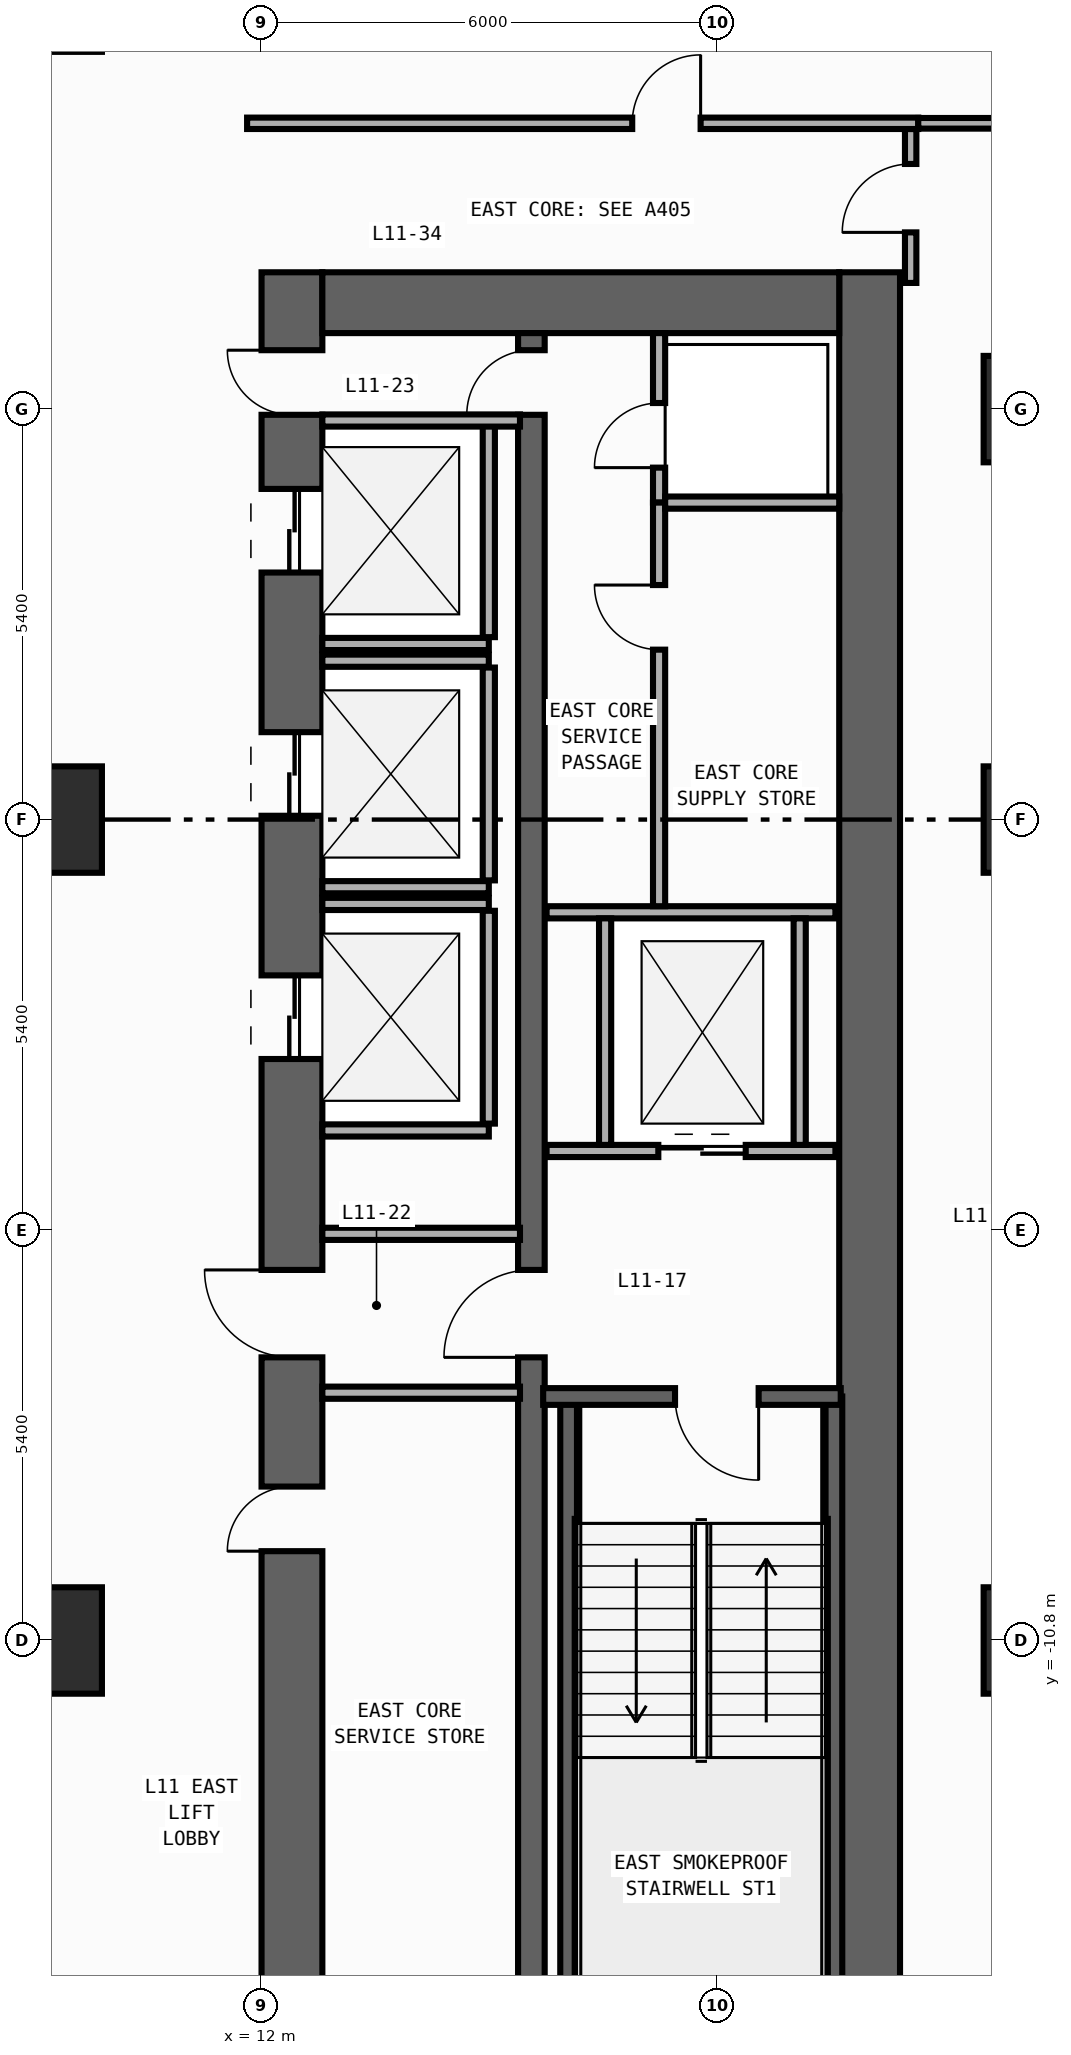
"""IFC4 building model, lengths in metres.
Left out: names, types, materials, properties, quantities, classifications, styles, units other than length and angle.
Written with IfcOpenShell. Run it as: python <this file> out.ifc"""

import sys

from ifc_helpers import new_model, si_unit, direction, frame, frame_2d, origin, origin_2d, place, context, subcontext, project, spatial, rectangle, extrude, element, fill, save


model = new_model("IFC4")
c1 = context("Model", 3, precision=1e-05, world=origin(), true_north=direction((0.0, 1.0)))
c2 = subcontext(c1, "Body", "Model", "MODEL_VIEW")
j1 = project(units=[si_unit("LENGTHUNIT", "METRE"), si_unit("PLANEANGLEUNIT", "RADIAN")], contexts=[c1])
p1 = place(None, origin())
s1 = spatial("IfcSite", under=j1, at=p1, CompositionType="ELEMENT")
p2 = place(p1, origin())
s2 = spatial("IfcBuilding", under=s1, at=p2, CompositionType="ELEMENT")
p3 = place(p2, frame((0.0, 0.0, 47.0)))
s3 = spatial("IfcBuildingStorey", under=s2, at=p3, CompositionType="ELEMENT", Elevation=47.0)
p4 = place(p3, frame((12.4, -19.8, 0.0), z_axis=(0.0, 0.0, 1.0), x_axis=(0.0, 1.0, 0.0)))
e1 = element("IfcWall", 1, at=p4, inside=s3, PredefinedType="SHEAR", context=c2, shape_type="SweptSolid", body=[
    extrude(rectangle(XDim=27.0, YDim=0.8, at=frame_2d((13.5, 0.0))), origin(), (0.0, 0.0, 1.0), 3.94),
])
p5 = place(p4, frame((23.05, 0.0, 0.0)))
e2 = element("IfcOpeningElement", 2, at=p5, cuts=e1, PredefinedType="OPENING", context=c2, shape_type="SweptSolid", body=[
    extrude(rectangle(XDim=1.1, YDim=2.2, at=frame_2d((0.55, 1.1))), frame((0.0, 0.41, 0.0), z_axis=(0.0, -1.0, 0.0), x_axis=(1.0, 0.0, 0.0)), (0.0, 0.0, 1.0), 0.82),
])
p6 = place(p4, frame((19.85, 0.0, 0.0)))
e3 = element("IfcOpeningElement", 3, at=p6, cuts=e1, PredefinedType="OPENING", context=c2, shape_type="SweptSolid", body=[
    extrude(rectangle(XDim=1.1, YDim=2.2, at=frame_2d((0.55, 1.1))), frame((0.0, 0.41, 0.0), z_axis=(0.0, -1.0, 0.0), x_axis=(1.0, 0.0, 0.0)), (0.0, 0.0, 1.0), 0.82),
])
p7 = place(p4, frame((16.65, 0.0, 0.0)))
e4 = element("IfcOpeningElement", 4, at=p7, cuts=e1, PredefinedType="OPENING", context=c2, shape_type="SweptSolid", body=[
    extrude(rectangle(XDim=1.1, YDim=2.2, at=frame_2d((0.55, 1.1))), frame((0.0, 0.41, 0.0), z_axis=(0.0, -1.0, 0.0), x_axis=(1.0, 0.0, 0.0)), (0.0, 0.0, 1.0), 0.82),
])
p8 = place(p4, frame((10.175, 0.0, 0.0)))
e5 = element("IfcOpeningElement", 5, at=p8, cuts=e1, PredefinedType="OPENING", context=c2, shape_type="SweptSolid", body=[
    extrude(rectangle(XDim=0.85, YDim=2.1, at=frame_2d((0.425, 1.05))), frame((0.0, 0.41, 0.0), z_axis=(0.0, -1.0, 0.0), x_axis=(1.0, 0.0, 0.0)), (0.0, 0.0, 1.0), 0.82),
])
p9 = place(p4, frame((12.725, 0.0, 0.0)))
e6 = element("IfcOpeningElement", 6, at=p9, cuts=e1, PredefinedType="OPENING", context=c2, shape_type="SweptSolid", body=[
    extrude(rectangle(XDim=1.15, YDim=2.2, at=frame_2d((0.575, 1.1))), frame((0.0, 0.41, 0.0), z_axis=(0.0, -1.0, 0.0), x_axis=(1.0, 0.0, 0.0)), (0.0, 0.0, 1.0), 0.82),
])
p10 = place(p4, frame((25.125, 0.0, 0.0)))
e7 = element("IfcOpeningElement", 7, at=p10, cuts=e1, PredefinedType="OPENING", context=c2, shape_type="SweptSolid", body=[
    extrude(rectangle(XDim=0.85, YDim=2.1, at=frame_2d((0.425, 1.05))), frame((0.0, 0.41, 0.0), z_axis=(0.0, -1.0, 0.0), x_axis=(1.0, 0.0, 0.0)), (0.0, 0.0, 1.0), 0.82),
])
p11 = place(p3, frame((20.0, -19.8, 0.0), z_axis=(0.0, 0.0, 1.0), x_axis=(0.0, 1.0, 0.0)))
e8 = element("IfcWall", 8, at=p11, inside=s3, PredefinedType="SHEAR", context=c2, shape_type="SweptSolid", body=[
    extrude(rectangle(XDim=27.0, YDim=0.8, at=frame_2d((13.5, 0.0))), origin(), (0.0, 0.0, 1.0), 3.94),
])
p12 = place(p3, frame((12.8, 6.8, 0.0), z_axis=(0.0, 0.0, 1.0), x_axis=(1.0, 0.0, 0.0)))
e9 = element("IfcWall", 9, at=p12, inside=s3, PredefinedType="SHEAR", context=c2, shape_type="SweptSolid", body=[
    extrude(rectangle(XDim=6.8, YDim=0.8, at=frame_2d((3.4, 0.0))), origin(), (0.0, 0.0, 1.0), 3.94),
])
p13 = place(p3, frame((15.55, -19.0, 0.0), z_axis=(0.0, 0.0, 1.0), x_axis=(0.0, 1.0, 0.0)))
e10 = element("IfcWall", 10, at=p13, inside=s3, PredefinedType="SHEAR", context=c2, shape_type="SweptSolid", body=[
    extrude(rectangle(XDim=25.4, YDim=0.35, at=frame_2d((12.7, 0.0))), origin(), (0.0, 0.0, 1.0), 3.94),
])
p14 = place(p13, frame((11.925, 0.0, 0.0)))
e11 = element("IfcOpeningElement", 11, at=p14, cuts=e10, PredefinedType="OPENING", context=c2, shape_type="SweptSolid", body=[
    extrude(rectangle(XDim=1.15, YDim=2.2, at=frame_2d((0.575, 1.1))), frame((0.0, 0.185, 0.0), z_axis=(0.0, -1.0, 0.0), x_axis=(1.0, 0.0, 0.0)), (0.0, 0.0, 1.0), 0.37),
])
p15 = place(p13, frame((24.325, 0.0, 0.0)))
e12 = element("IfcOpeningElement", 12, at=p15, cuts=e10, PredefinedType="OPENING", context=c2, shape_type="SweptSolid", body=[
    extrude(rectangle(XDim=0.85, YDim=2.1, at=frame_2d((0.425, 1.05))), frame((0.0, 0.185, 0.0), z_axis=(0.0, -1.0, 0.0), x_axis=(1.0, 0.0, 0.0)), (0.0, 0.0, 1.0), 0.37),
])
for number, where, z_axis, x_axis in (
    (13, (16.04, -18.89, 0.0), (0.0, 0.0, 1.0), (0.0, 1.0, 0.0)),
    (14, (19.53, -18.89, 0.0), (0.0, 0.0, 1.0), (0.0, 1.0, 0.0)),
):
    element("IfcWall", number, at=place(p3, frame(where, z_axis=z_axis, x_axis=x_axis)), inside=s3, PredefinedType="SHEAR", context=c2, shape_type="SweptSolid", body=[
        extrude(rectangle(XDim=11.3, YDim=0.22, at=frame_2d((5.65, 0.0))), origin(), (0.0, 0.0, 1.0), 3.94),
    ])
p16 = place(p3, frame((19.62, -7.59, 0.0), z_axis=(0.0, 0.0, 1.0), x_axis=(-1.0, 0.0, 0.0)))
e15 = element("IfcWall", 15, at=p16, inside=s3, PredefinedType="SHEAR", context=c2, shape_type="SweptSolid", body=[
    extrude(rectangle(XDim=3.915, YDim=0.22, at=frame_2d((1.958, 0.0))), origin(), (0.0, 0.0, 1.0), 3.94),
])
p17 = place(p16, frame((1.08, 0.0, 0.0)))
e16 = element("IfcOpeningElement", 16, at=p17, cuts=e15, PredefinedType="OPENING", context=c2, shape_type="SweptSolid", body=[
    extrude(rectangle(XDim=1.1, YDim=2.2, at=frame_2d((0.55, 1.1))), frame((0.0, 0.12, 0.0), z_axis=(0.0, -1.0, 0.0), x_axis=(1.0, 0.0, 0.0)), (0.0, 0.0, 1.0), 0.24),
])
for number, where, z_axis, x_axis in (
    (17, (9.2, -10.8, 0.0), (0.0, 0.0, 1.0), (1.0, 0.0, 0.0)),
    (18, (9.2, 0.0, 0.0), (0.0, 0.0, 1.0), (1.0, 0.0, 0.0)),
    (19, (22.2, -10.8, 0.0), (0.0, 0.0, 1.0), (1.0, 0.0, 0.0)),
    (20, (22.2, 0.0, 0.0), (0.0, 0.0, 1.0), (1.0, 0.0, 0.0)),
    (21, (22.2, 5.4, 0.0), (0.0, 0.0, 1.0), (1.0, 0.0, 0.0)),
):
    element("IfcColumn", number, at=place(p3, frame(where, z_axis=z_axis, x_axis=x_axis)), inside=s3, PredefinedType="COLUMN", context=c2, shape_type="SweptSolid", body=[
        extrude(rectangle(XDim=1.4, YDim=1.4, at=origin_2d()), origin(), (0.0, 0.0, 1.0), 4.2),
    ])
p18 = place(p3, frame((12.8, 2.31, 0.0), z_axis=(0.0, 0.0, 1.0), x_axis=(1.0, 0.0, 0.0)))
e22 = element("IfcWall", 22, at=p18, inside=s3, PredefinedType="STANDARD", context=c2, shape_type="SweptSolid", body=[
    extrude(rectangle(XDim=2.19, YDim=0.16, at=frame_2d((1.095, 0.0))), origin(), (0.0, 0.0, 1.0), 3.94),
])
p19 = place(p3, frame((14.99, 2.4, 0.0), z_axis=(0.0, 0.0, 1.0), x_axis=(0.0, 1.0, 0.0)))
e23 = element("IfcWall", 23, at=p19, inside=s3, PredefinedType="STANDARD", context=c2, shape_type="SweptSolid", body=[
    extrude(rectangle(XDim=2.8, YDim=0.16, at=frame_2d((1.4, 0.0))), origin(), (0.0, 0.0, 1.0), 3.94),
])
for number, where, z_axis, x_axis in (
    (24, (12.8, -0.89, 0.0), (0.0, 0.0, 1.0), (1.0, 0.0, 0.0)),
    (25, (12.8, 2.09, 0.0), (0.0, 0.0, 1.0), (1.0, 0.0, 0.0)),
):
    element("IfcWall", number, at=place(p3, frame(where, z_axis=z_axis, x_axis=x_axis)), inside=s3, PredefinedType="STANDARD", context=c2, shape_type="SweptSolid", body=[
        extrude(rectangle(XDim=2.19, YDim=0.16, at=frame_2d((1.095, 0.0))), origin(), (0.0, 0.0, 1.0), 3.94),
    ])
p20 = place(p3, frame((14.99, -0.8, 0.0), z_axis=(0.0, 0.0, 1.0), x_axis=(0.0, 1.0, 0.0)))
e26 = element("IfcWall", 26, at=p20, inside=s3, PredefinedType="STANDARD", context=c2, shape_type="SweptSolid", body=[
    extrude(rectangle(XDim=2.8, YDim=0.16, at=frame_2d((1.4, 0.0))), origin(), (0.0, 0.0, 1.0), 3.94),
])
for number, where, z_axis, x_axis in (
    (27, (12.8, -4.09, 0.0), (0.0, 0.0, 1.0), (1.0, 0.0, 0.0)),
    (28, (12.8, -1.11, 0.0), (0.0, 0.0, 1.0), (1.0, 0.0, 0.0)),
):
    element("IfcWall", number, at=place(p3, frame(where, z_axis=z_axis, x_axis=x_axis)), inside=s3, PredefinedType="STANDARD", context=c2, shape_type="SweptSolid", body=[
        extrude(rectangle(XDim=2.19, YDim=0.16, at=frame_2d((1.095, 0.0))), origin(), (0.0, 0.0, 1.0), 3.94),
    ])
p21 = place(p3, frame((14.99, -4.0, 0.0), z_axis=(0.0, 0.0, 1.0), x_axis=(0.0, 1.0, 0.0)))
e29 = element("IfcWall", 29, at=p21, inside=s3, PredefinedType="STANDARD", context=c2, shape_type="SweptSolid", body=[
    extrude(rectangle(XDim=2.8, YDim=0.16, at=frame_2d((1.4, 0.0))), origin(), (0.0, 0.0, 1.0), 3.94),
])
p22 = place(p3, frame((15.75, -4.36, 0.0), z_axis=(0.0, 0.0, 1.0), x_axis=(1.0, 0.0, 0.0)))
e30 = element("IfcWall", 30, at=p22, inside=s3, PredefinedType="STANDARD", context=c2, shape_type="SweptSolid", body=[
    extrude(rectangle(XDim=3.8, YDim=0.16, at=frame_2d((1.9, 0.0))), origin(), (0.0, 0.0, 1.0), 3.94),
])
p23 = place(p22, frame((1.47, 0.0, 0.0)))
e31 = element("IfcOpeningElement", 31, at=p23, cuts=e30, PredefinedType="OPENING", context=c2, shape_type="SweptSolid", body=[
    extrude(rectangle(XDim=1.15, YDim=2.2, at=frame_2d((0.575, 1.1))), frame((0.0, 0.09, 0.0), z_axis=(0.0, -1.0, 0.0), x_axis=(1.0, 0.0, 0.0)), (0.0, 0.0, 1.0), 0.18),
])
p24 = place(p3, frame((15.75, -1.22, 0.0), z_axis=(0.0, 0.0, 1.0), x_axis=(1.0, 0.0, 0.0)))
e32 = element("IfcWall", 32, at=p24, inside=s3, PredefinedType="STANDARD", context=c2, shape_type="SweptSolid", body=[
    extrude(rectangle(XDim=3.8, YDim=0.16, at=frame_2d((1.9, 0.0))), origin(), (0.0, 0.0, 1.0), 3.94),
])
for number, where, z_axis, x_axis in (
    (33, (16.52, -4.28, 0.0), (0.0, 0.0, 1.0), (0.0, 1.0, 0.0)),
    (34, (19.08, -4.28, 0.0), (0.0, 0.0, 1.0), (0.0, 1.0, 0.0)),
):
    element("IfcWall", number, at=place(p3, frame(where, z_axis=z_axis, x_axis=x_axis)), inside=s3, PredefinedType="STANDARD", context=c2, shape_type="SweptSolid", body=[
        extrude(rectangle(XDim=2.98, YDim=0.16, at=frame_2d((1.49, 0.0))), origin(), (0.0, 0.0, 1.0), 3.94),
    ])
for number, where, z_axis, x_axis in (
    (35, (12.8, -5.45, 0.0), (0.0, 0.0, 1.0), (1.0, 0.0, 0.0)),
    (36, (12.8, -7.54, 0.0), (0.0, 0.0, 1.0), (1.0, 0.0, 0.0)),
    (37, (12.8, 5.25, 0.0), (0.0, 0.0, 1.0), (1.0, 0.0, 0.0)),
):
    element("IfcWall", number, at=place(p3, frame(where, z_axis=z_axis, x_axis=x_axis)), inside=s3, PredefinedType="STANDARD", context=c2, shape_type="SweptSolid", body=[
        extrude(rectangle(XDim=2.6, YDim=0.16, at=frame_2d((1.3, 0.0))), origin(), (0.0, 0.0, 1.0), 3.94),
    ])
p25 = place(p3, frame((17.23, 4.17, 0.0), z_axis=(0.0, 0.0, 1.0), x_axis=(0.0, 1.0, 0.0)))
e38 = element("IfcWall", 38, at=p25, inside=s3, PredefinedType="PARTITIONING", context=c2, shape_type="SweptSolid", body=[
    extrude(rectangle(XDim=2.23, YDim=0.16, at=frame_2d((1.115, 0.0))), origin(), (0.0, 0.0, 1.0), 3.94),
])
p26 = place(p25, frame((0.46, 0.0, 0.0)))
e39 = element("IfcOpeningElement", 39, at=p26, cuts=e38, PredefinedType="OPENING", context=c2, shape_type="SweptSolid", body=[
    extrude(rectangle(XDim=0.85, YDim=2.1, at=frame_2d((0.425, 1.05))), frame((0.0, 0.09, 0.0), z_axis=(0.0, -1.0, 0.0), x_axis=(1.0, 0.0, 0.0)), (0.0, 0.0, 1.0), 0.18),
])
p27 = place(p3, frame((17.23, -1.14, 0.0), z_axis=(0.0, 0.0, 1.0), x_axis=(0.0, 1.0, 0.0)))
e40 = element("IfcWall", 40, at=p27, inside=s3, PredefinedType="PARTITIONING", context=c2, shape_type="SweptSolid", body=[
    extrude(rectangle(XDim=5.31, YDim=0.16, at=frame_2d((2.655, 0.0))), origin(), (0.0, 0.0, 1.0), 3.94),
])
p28 = place(p27, frame((3.375, 0.0, 0.0)))
e41 = element("IfcOpeningElement", 41, at=p28, cuts=e40, PredefinedType="OPENING", context=c2, shape_type="SweptSolid", body=[
    extrude(rectangle(XDim=0.85, YDim=2.1, at=frame_2d((0.425, 1.05))), frame((0.0, 0.09, 0.0), z_axis=(0.0, -1.0, 0.0), x_axis=(1.0, 0.0, 0.0)), (0.0, 0.0, 1.0), 0.18),
])
p29 = place(p3, frame((17.31, 4.17, 0.0), z_axis=(0.0, 0.0, 1.0), x_axis=(1.0, 0.0, 0.0)))
e42 = element("IfcWall", 42, at=p29, inside=s3, PredefinedType="PARTITIONING", context=c2, shape_type="SweptSolid", body=[
    extrude(rectangle(XDim=2.29, YDim=0.16, at=frame_2d((1.145, 0.0))), origin(), (0.0, 0.0, 1.0), 3.94),
])
p30 = place(p3, frame((20.54, 7.06, 0.0), z_axis=(0.0, 0.0, 1.0), x_axis=(0.0, 1.0, 0.0)))
e43 = element("IfcWall", 43, at=p30, inside=s3, PredefinedType="PARTITIONING", context=c2, shape_type="SweptSolid", body=[
    extrude(rectangle(XDim=2.025, YDim=0.15, at=frame_2d((1.012, 0.0))), origin(), (0.0, 0.0, 1.0), 3.94),
])
p31 = place(p30, frame((0.665, 0.0, 0.0)))
e44 = element("IfcOpeningElement", 44, at=p31, cuts=e43, PredefinedType="OPENING", context=c2, shape_type="SweptSolid", body=[
    extrude(rectangle(XDim=0.9, YDim=2.15, at=frame_2d((0.45, 1.075))), frame((0.0, 0.085, 0.0), z_axis=(0.0, -1.0, 0.0), x_axis=(1.0, 0.0, 0.0)), (0.0, 0.0, 1.0), 0.17),
])
p32 = place(p3, frame((11.81, 9.16, 0.0), z_axis=(0.0, 0.0, 1.0), x_axis=(1.0, 0.0, 0.0)))
e45 = element("IfcWall", 45, at=p32, inside=s3, PredefinedType="PARTITIONING", context=c2, shape_type="SweptSolid", body=[
    extrude(rectangle(XDim=8.83, YDim=0.15, at=frame_2d((4.415, 0.0))), origin(), (0.0, 0.0, 1.0), 3.94),
])
p33 = place(p32, frame((5.067, 0.0, 0.0)))
e46 = element("IfcOpeningElement", 46, at=p33, cuts=e45, PredefinedType="OPENING", context=c2, shape_type="SweptSolid", body=[
    extrude(rectangle(XDim=0.9, YDim=2.15, at=frame_2d((0.45, 1.075))), frame((0.0, 0.085, 0.0), z_axis=(0.0, -1.0, 0.0), x_axis=(1.0, 0.0, 0.0)), (0.0, 0.0, 1.0), 0.17),
])
p34 = place(p3, frame((20.64, 9.16, 0.0), z_axis=(0.0, 0.0, 1.0), x_axis=(1.0, 0.0, 0.0)))
e47 = element("IfcWall", 47, at=p34, inside=s3, PredefinedType="PARTITIONING", context=c2, shape_type="SweptSolid", body=[
    extrude(rectangle(XDim=3.415, YDim=0.14, at=frame_2d((1.708, 0.0))), origin(), (0.0, 0.0, 1.0), 3.94),
])
p35 = place(p17, origin())
e48 = element("IfcDoor", 48, at=p35, inside=s3, OperationType="SINGLE_SWING_LEFT", PredefinedType="DOOR", context=c2, shape_type="SweptSolid", body=[
    extrude(rectangle(XDim=1.1, YDim=2.2, at=frame_2d((0.55, 1.1))), frame((0.0, 0.025, 0.0), z_axis=(0.0, -1.0, 0.0), x_axis=(1.0, 0.0, 0.0)), (0.0, 0.0, 1.0), 0.05),
])
fill(e16, e48)
p36 = place(p5, origin())
e49 = element("IfcDoor", 49, at=p36, inside=s3, OperationType="DOUBLE_DOOR_SLIDING", PredefinedType="DOOR", context=c2, shape_type="SweptSolid", body=[
    extrude(rectangle(XDim=1.1, YDim=2.2, at=frame_2d((0.55, 1.1))), frame((0.0, 0.025, 0.0), z_axis=(0.0, -1.0, 0.0), x_axis=(1.0, 0.0, 0.0)), (0.0, 0.0, 1.0), 0.05),
])
fill(e2, e49)
p37 = place(p6, origin())
e50 = element("IfcDoor", 50, at=p37, inside=s3, OperationType="DOUBLE_DOOR_SLIDING", PredefinedType="DOOR", context=c2, shape_type="SweptSolid", body=[
    extrude(rectangle(XDim=1.1, YDim=2.2, at=frame_2d((0.55, 1.1))), frame((0.0, 0.025, 0.0), z_axis=(0.0, -1.0, 0.0), x_axis=(1.0, 0.0, 0.0)), (0.0, 0.0, 1.0), 0.05),
])
fill(e3, e50)
p38 = place(p7, origin())
e51 = element("IfcDoor", 51, at=p38, inside=s3, OperationType="DOUBLE_DOOR_SLIDING", PredefinedType="DOOR", context=c2, shape_type="SweptSolid", body=[
    extrude(rectangle(XDim=1.1, YDim=2.2, at=frame_2d((0.55, 1.1))), frame((0.0, 0.025, 0.0), z_axis=(0.0, -1.0, 0.0), x_axis=(1.0, 0.0, 0.0)), (0.0, 0.0, 1.0), 0.05),
])
fill(e4, e51)
p39 = place(p8, origin())
e52 = element("IfcDoor", 52, at=p39, inside=s3, OperationType="SINGLE_SWING_LEFT", PredefinedType="DOOR", context=c2, shape_type="SweptSolid", body=[
    extrude(rectangle(XDim=0.85, YDim=2.1, at=frame_2d((0.425, 1.05))), frame((0.0, 0.025, 0.0), z_axis=(0.0, -1.0, 0.0), x_axis=(1.0, 0.0, 0.0)), (0.0, 0.0, 1.0), 0.05),
])
fill(e5, e52)
p40 = place(p9, origin())
e53 = element("IfcDoor", 53, at=p40, inside=s3, OperationType="SINGLE_SWING_RIGHT", PredefinedType="DOOR", context=c2, shape_type="SweptSolid", body=[
    extrude(rectangle(XDim=1.15, YDim=2.2, at=frame_2d((0.575, 1.1))), frame((0.0, 0.025, 0.0), z_axis=(0.0, -1.0, 0.0), x_axis=(1.0, 0.0, 0.0)), (0.0, 0.0, 1.0), 0.05),
])
fill(e6, e53)
p41 = place(p14, origin())
e54 = element("IfcDoor", 54, at=p41, inside=s3, OperationType="SINGLE_SWING_LEFT", PredefinedType="DOOR", context=c2, shape_type="SweptSolid", body=[
    extrude(rectangle(XDim=1.15, YDim=2.2, at=frame_2d((0.575, 1.1))), frame((0.0, 0.025, 0.0), z_axis=(0.0, -1.0, 0.0), x_axis=(1.0, 0.0, 0.0)), (0.0, 0.0, 1.0), 0.05),
])
fill(e11, e54)
p42 = place(p10, origin())
e55 = element("IfcDoor", 55, at=p42, inside=s3, OperationType="SINGLE_SWING_RIGHT", PredefinedType="DOOR", context=c2, shape_type="SweptSolid", body=[
    extrude(rectangle(XDim=0.85, YDim=2.1, at=frame_2d((0.425, 1.05))), frame((0.0, 0.025, 0.0), z_axis=(0.0, -1.0, 0.0), x_axis=(1.0, 0.0, 0.0)), (0.0, 0.0, 1.0), 0.05),
])
fill(e7, e55)
p43 = place(p15, origin())
e56 = element("IfcDoor", 56, at=p43, inside=s3, OperationType="SINGLE_SWING_LEFT", PredefinedType="DOOR", context=c2, shape_type="SweptSolid", body=[
    extrude(rectangle(XDim=0.85, YDim=2.1, at=frame_2d((0.425, 1.05))), frame((0.0, 0.025, 0.0), z_axis=(0.0, -1.0, 0.0), x_axis=(1.0, 0.0, 0.0)), (0.0, 0.0, 1.0), 0.05),
])
fill(e12, e56)
p44 = place(p23, origin())
e57 = element("IfcDoor", 57, at=p44, inside=s3, OperationType="DOUBLE_DOOR_SLIDING", PredefinedType="DOOR", context=c2, shape_type="SweptSolid", body=[
    extrude(rectangle(XDim=1.15, YDim=2.2, at=frame_2d((0.575, 1.1))), frame((0.0, 0.025, 0.0), z_axis=(0.0, -1.0, 0.0), x_axis=(1.0, 0.0, 0.0)), (0.0, 0.0, 1.0), 0.05),
])
fill(e31, e57)
p45 = place(p26, origin())
e58 = element("IfcDoor", 58, at=p45, inside=s3, OperationType="SINGLE_SWING_LEFT", PredefinedType="DOOR", context=c2, shape_type="SweptSolid", body=[
    extrude(rectangle(XDim=0.85, YDim=2.1, at=frame_2d((0.425, 1.05))), frame((0.0, 0.025, 0.0), z_axis=(0.0, -1.0, 0.0), x_axis=(1.0, 0.0, 0.0)), (0.0, 0.0, 1.0), 0.05),
])
fill(e39, e58)
p46 = place(p28, origin())
e59 = element("IfcDoor", 59, at=p46, inside=s3, OperationType="SINGLE_SWING_RIGHT", PredefinedType="DOOR", context=c2, shape_type="SweptSolid", body=[
    extrude(rectangle(XDim=0.85, YDim=2.1, at=frame_2d((0.425, 1.05))), frame((0.0, 0.025, 0.0), z_axis=(0.0, -1.0, 0.0), x_axis=(1.0, 0.0, 0.0)), (0.0, 0.0, 1.0), 0.05),
])
fill(e41, e59)
p47 = place(p31, origin())
e60 = element("IfcDoor", 60, at=p47, inside=s3, OperationType="SINGLE_SWING_LEFT", PredefinedType="DOOR", context=c2, shape_type="SweptSolid", body=[
    extrude(rectangle(XDim=0.9, YDim=2.15, at=frame_2d((0.45, 1.075))), frame((0.0, 0.025, 0.0), z_axis=(0.0, -1.0, 0.0), x_axis=(1.0, 0.0, 0.0)), (0.0, 0.0, 1.0), 0.05),
])
fill(e44, e60)
p48 = place(p33, origin())
e61 = element("IfcDoor", 61, at=p48, inside=s3, OperationType="SINGLE_SWING_RIGHT", PredefinedType="DOOR", context=c2, shape_type="SweptSolid", body=[
    extrude(rectangle(XDim=0.9, YDim=2.15, at=frame_2d((0.45, 1.075))), frame((0.0, 0.025, 0.0), z_axis=(0.0, -1.0, 0.0), x_axis=(1.0, 0.0, 0.0)), (0.0, 0.0, 1.0), 0.05),
])
fill(e46, e61)
save(model, sys.argv[1])
